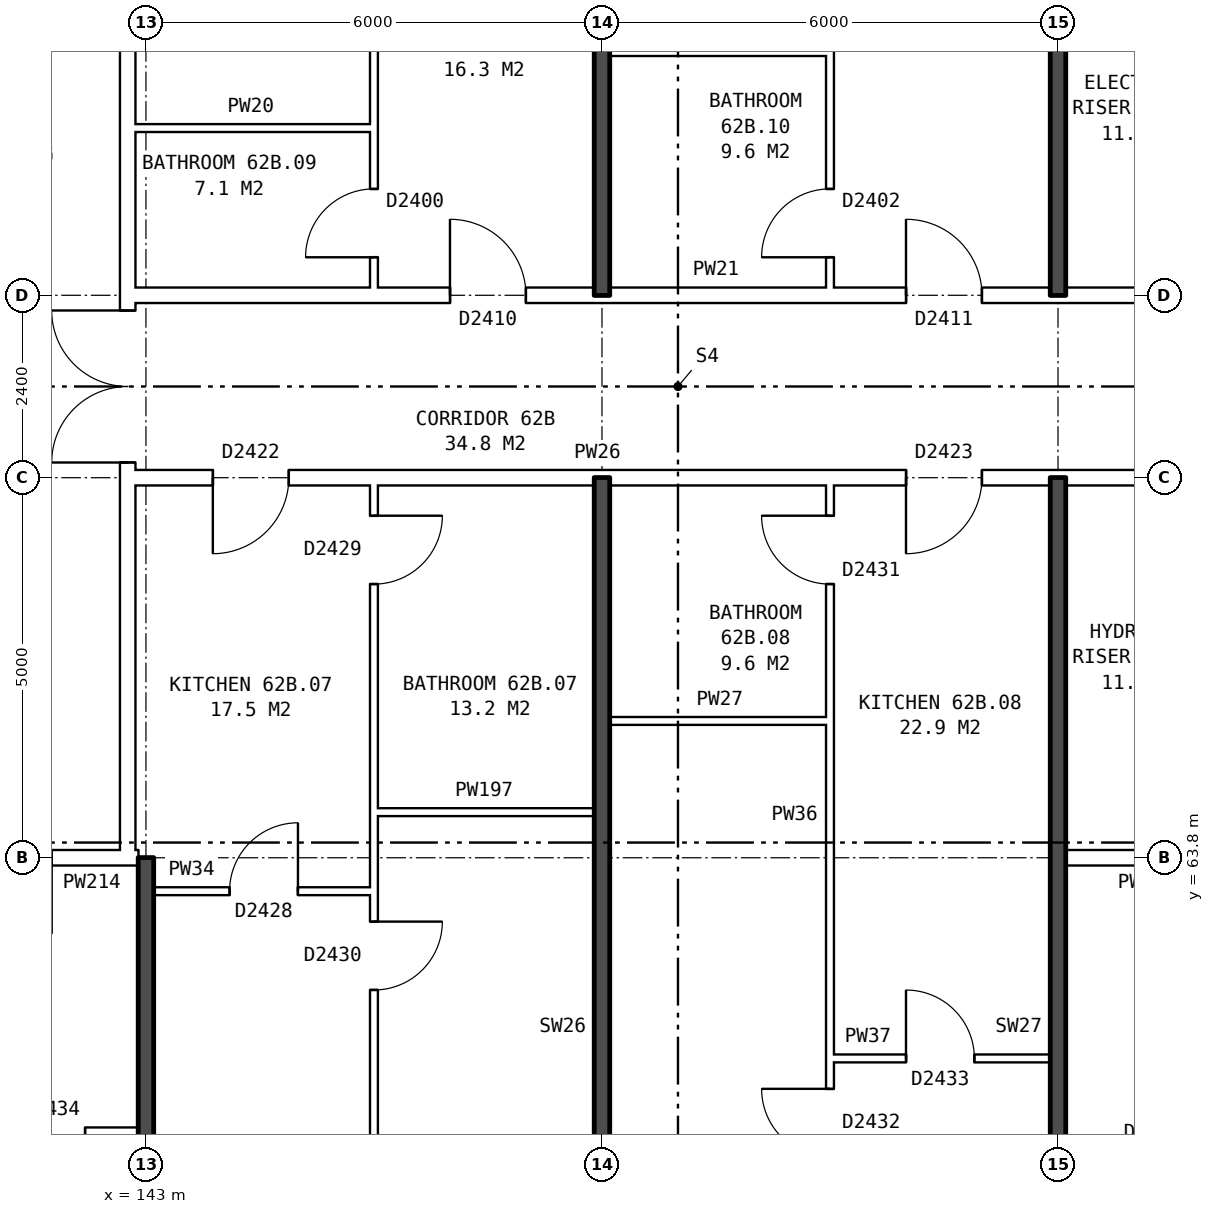
"""IFC4 building model, lengths in metres.
Left out: names, types, materials, properties, quantities, classifications, styles, units other than length and angle.
Written with IfcOpenShell. Run it as: python <this file> out.ifc"""

import sys

from ifc_helpers import new_model, si_unit, direction, frame, frame_2d, origin, place, context, subcontext, project, spatial, rectangle, extrude, element, fill, save


model = new_model("IFC4")
c1 = context("Model", 3, precision=1e-05, world=origin(), true_north=direction((0.0, 1.0)))
c2 = subcontext(c1, "Body", "Model", "MODEL_VIEW")
j1 = project(units=[si_unit("LENGTHUNIT", "METRE"), si_unit("PLANEANGLEUNIT", "RADIAN")], contexts=[c1])
p1 = place(None, origin())
s1 = spatial("IfcSite", under=j1, at=p1, CompositionType="ELEMENT")
p2 = place(p1, origin())
s2 = spatial("IfcBuilding", under=s1, at=p2, CompositionType="ELEMENT")
p3 = place(p2, frame((0.0, 0.0, 221.4)))
s3 = spatial("IfcBuildingStorey", under=s2, at=p3, CompositionType="ELEMENT", Elevation=221.4)
p4 = place(p3, frame((142.76, 63.9, 0.0), z_axis=(0.0, 0.0, 1.0), x_axis=(0.0, 1.0, 0.0)))
e1 = element("IfcWall", 1, at=p4, inside=s3, PredefinedType="PARTITIONING", context=c2, shape_type="SweptSolid", body=[
    extrude(rectangle(XDim=12.2, YDim=0.2, at=frame_2d((6.1, 0.0))), origin(), (0.0, 0.0, 1.0), 2.85),
])
p5 = place(p4, frame((5.1, 0.0, 0.0)))
e2 = element("IfcOpeningElement", 2, at=p5, cuts=e1, PredefinedType="OPENING", context=c2, shape_type="SweptSolid", body=[
    extrude(rectangle(XDim=2.0, YDim=2.1, at=frame_2d((1.0, 1.05))), frame((0.0, 0.11, 0.0), z_axis=(0.0, -1.0, 0.0), x_axis=(1.0, 0.0, 0.0)), (0.0, 0.0, 1.0), 0.22),
])
p6 = place(p3, frame((137.1, 60.2, 0.0), z_axis=(0.0, 0.0, 1.0), x_axis=(1.0, 0.0, 0.0)))
e3 = element("IfcWall", 3, at=p6, inside=s3, PredefinedType="PARTITIONING", context=c2, shape_type="SweptSolid", body=[
    extrude(rectangle(XDim=5.8, YDim=0.1, at=frame_2d((2.9, 0.0))), origin(), (0.0, 0.0, 1.0), 2.85),
])
p7 = place(p6, frame((1.3, 0.0, 0.0)))
e4 = element("IfcOpeningElement", 4, at=p7, cuts=e3, PredefinedType="OPENING", context=c2, shape_type="SweptSolid", body=[
    extrude(rectangle(XDim=0.9, YDim=2.1, at=frame_2d((0.45, 1.05))), frame((0.0, 0.06, 0.0), z_axis=(0.0, -1.0, 0.0), x_axis=(1.0, 0.0, 0.0)), (0.0, 0.0, 1.0), 0.12),
])
p8 = place(p6, frame((4.2, 0.0, 0.0)))
e5 = element("IfcOpeningElement", 5, at=p8, cuts=e3, PredefinedType="OPENING", context=c2, shape_type="SweptSolid", body=[
    extrude(rectangle(XDim=0.9, YDim=2.1, at=frame_2d((0.45, 1.05))), frame((0.0, 0.06, 0.0), z_axis=(0.0, -1.0, 0.0), x_axis=(1.0, 0.0, 0.0)), (0.0, 0.0, 1.0), 0.12),
])
p9 = place(p3, frame((152.0, 61.16, 0.0), z_axis=(0.0, 0.0, 1.0), x_axis=(1.0, 0.0, 0.0)))
e6 = element("IfcWall", 6, at=p9, inside=s3, PredefinedType="PARTITIONING", context=c2, shape_type="SweptSolid", body=[
    extrude(rectangle(XDim=2.9, YDim=0.1, at=frame_2d((1.45, 0.0))), origin(), (0.0, 0.0, 1.0), 2.85),
])
p10 = place(p9, frame((1.0, 0.0, 0.0)))
e7 = element("IfcOpeningElement", 7, at=p10, cuts=e6, PredefinedType="OPENING", context=c2, shape_type="SweptSolid", body=[
    extrude(rectangle(XDim=0.9, YDim=2.1, at=frame_2d((0.45, 1.05))), frame((0.0, 0.06, 0.0), z_axis=(0.0, -1.0, 0.0), x_axis=(1.0, 0.0, 0.0)), (0.0, 0.0, 1.0), 0.12),
])
p11 = place(p3, frame((143.1, 63.36, 0.0), z_axis=(0.0, 0.0, 1.0), x_axis=(1.0, 0.0, 0.0)))
e8 = element("IfcWall", 8, at=p11, inside=s3, PredefinedType="PARTITIONING", context=c2, shape_type="SweptSolid", body=[
    extrude(rectangle(XDim=2.9, YDim=0.1, at=frame_2d((1.45, 0.0))), origin(), (0.0, 0.0, 1.0), 2.85),
])
p12 = place(p11, frame((1.0, 0.0, 0.0)))
e9 = element("IfcOpeningElement", 9, at=p12, cuts=e8, PredefinedType="OPENING", context=c2, shape_type="SweptSolid", body=[
    extrude(rectangle(XDim=0.9, YDim=2.1, at=frame_2d((0.45, 1.05))), frame((0.0, 0.06, 0.0), z_axis=(0.0, -1.0, 0.0), x_axis=(1.0, 0.0, 0.0)), (0.0, 0.0, 1.0), 0.12),
])
p13 = place(p3, frame((139.76, 63.8, 0.0), z_axis=(0.0, 0.0, 1.0), x_axis=(1.0, 0.0, 0.0)))
e10 = element("IfcWall", 10, at=p13, inside=s3, PredefinedType="PARTITIONING", context=c2, shape_type="SweptSolid", body=[
    extrude(rectangle(XDim=3.0, YDim=0.2, at=frame_2d((1.5, 0.0))), origin(), (0.0, 0.0, 1.0), 2.85),
])
p14 = place(p13, frame((1.0, 0.0, 0.0)))
e11 = element("IfcOpeningElement", 11, at=p14, cuts=e10, PredefinedType="OPENING", context=c2, shape_type="SweptSolid", body=[
    extrude(rectangle(XDim=1.0, YDim=2.1, at=frame_2d((0.5, 1.05))), frame((0.0, 0.11, 0.0), z_axis=(0.0, -1.0, 0.0), x_axis=(1.0, 0.0, 0.0)), (0.0, 0.0, 1.0), 0.22),
])
p15 = place(p3, frame((142.76, 63.8, 0.0), z_axis=(0.0, 0.0, 1.0), x_axis=(1.0, 0.0, 0.0)))
e12 = element("IfcWall", 12, at=p15, inside=s3, PredefinedType="PARTITIONING", context=c2, shape_type="SweptSolid", body=[
    extrude(rectangle(XDim=0.14, YDim=0.2, at=frame_2d((0.07, 0.0))), origin(), (0.0, 0.0, 1.0), 2.85),
])
p16 = place(p3, frame((155.1, 63.8, 0.0), z_axis=(0.0, 0.0, 1.0), x_axis=(1.0, 0.0, 0.0)))
e13 = element("IfcWall", 13, at=p16, inside=s3, PredefinedType="PARTITIONING", context=c2, shape_type="SweptSolid", body=[
    extrude(rectangle(XDim=2.14, YDim=0.2, at=frame_2d((1.07, 0.0))), origin(), (0.0, 0.0, 1.0), 2.85),
])
for number, where, z_axis, x_axis in (
    (14, (146.0, 64.4, 0.0), (0.0, 0.0, 1.0), (1.0, 0.0, 0.0)),
    (15, (149.1, 65.6, 0.0), (0.0, 0.0, 1.0), (1.0, 0.0, 0.0)),
):
    element("IfcWall", number, at=place(p3, frame(where, z_axis=z_axis, x_axis=x_axis)), inside=s3, PredefinedType="PARTITIONING", context=c2, shape_type="SweptSolid", body=[
        extrude(rectangle(XDim=2.9, YDim=0.1, at=frame_2d((1.45, 0.0))), origin(), (0.0, 0.0, 1.0), 2.85),
    ])
p17 = place(p3, frame((142.76, 68.8, 0.0), z_axis=(0.0, 0.0, 1.0), x_axis=(1.0, 0.0, 0.0)))
e16 = element("IfcWall", 16, at=p17, inside=s3, PredefinedType="PARTITIONING", context=c2, shape_type="SweptSolid", body=[
    extrude(rectangle(XDim=14.48, YDim=0.2, at=frame_2d((7.24, 0.0))), origin(), (0.0, 0.0, 1.0), 2.85),
])
p18 = place(p17, frame((1.12, 0.0, 0.0)))
e17 = element("IfcOpeningElement", 17, at=p18, cuts=e16, PredefinedType="OPENING", context=c2, shape_type="SweptSolid", body=[
    extrude(rectangle(XDim=1.0, YDim=2.1, at=frame_2d((0.5, 1.05))), frame((0.0, 0.11, 0.0), z_axis=(0.0, -1.0, 0.0), x_axis=(1.0, 0.0, 0.0)), (0.0, 0.0, 1.0), 0.22),
])
p19 = place(p17, frame((10.24, 0.0, 0.0)))
e18 = element("IfcOpeningElement", 18, at=p19, cuts=e16, PredefinedType="OPENING", context=c2, shape_type="SweptSolid", body=[
    extrude(rectangle(XDim=1.0, YDim=2.1, at=frame_2d((0.5, 1.05))), frame((0.0, 0.11, 0.0), z_axis=(0.0, -1.0, 0.0), x_axis=(1.0, 0.0, 0.0)), (0.0, 0.0, 1.0), 0.22),
])
p20 = place(p3, frame((142.76, 71.2, 0.0), z_axis=(0.0, 0.0, 1.0), x_axis=(1.0, 0.0, 0.0)))
e19 = element("IfcWall", 19, at=p20, inside=s3, PredefinedType="PARTITIONING", context=c2, shape_type="SweptSolid", body=[
    extrude(rectangle(XDim=14.48, YDim=0.2, at=frame_2d((7.24, 0.0))), origin(), (0.0, 0.0, 1.0), 2.85),
])
p21 = place(p20, frame((4.24, 0.0, 0.0)))
e20 = element("IfcOpeningElement", 20, at=p21, cuts=e19, PredefinedType="OPENING", context=c2, shape_type="SweptSolid", body=[
    extrude(rectangle(XDim=1.0, YDim=2.1, at=frame_2d((0.5, 1.05))), frame((0.0, 0.11, 0.0), z_axis=(0.0, -1.0, 0.0), x_axis=(1.0, 0.0, 0.0)), (0.0, 0.0, 1.0), 0.22),
])
p22 = place(p20, frame((10.24, 0.0, 0.0)))
e21 = element("IfcOpeningElement", 21, at=p22, cuts=e19, PredefinedType="OPENING", context=c2, shape_type="SweptSolid", body=[
    extrude(rectangle(XDim=1.0, YDim=2.1, at=frame_2d((0.5, 1.05))), frame((0.0, 0.11, 0.0), z_axis=(0.0, -1.0, 0.0), x_axis=(1.0, 0.0, 0.0)), (0.0, 0.0, 1.0), 0.22),
])
p23 = place(p3, frame((142.76, 73.4, 0.0), z_axis=(0.0, 0.0, 1.0), x_axis=(1.0, 0.0, 0.0)))
e22 = element("IfcWall", 22, at=p23, inside=s3, PredefinedType="PARTITIONING", context=c2, shape_type="SweptSolid", body=[
    extrude(rectangle(XDim=3.24, YDim=0.1, at=frame_2d((1.62, 0.0))), origin(), (0.0, 0.0, 1.0), 2.85),
])
p24 = place(p3, frame((149.1, 74.4, 0.0), z_axis=(0.0, 0.0, 1.0), x_axis=(1.0, 0.0, 0.0)))
e23 = element("IfcWall", 23, at=p24, inside=s3, PredefinedType="PARTITIONING", context=c2, shape_type="SweptSolid", body=[
    extrude(rectangle(XDim=2.9, YDim=0.1, at=frame_2d((1.45, 0.0))), origin(), (0.0, 0.0, 1.0), 2.85),
])
p25 = place(p3, frame((143.0, 54.36, 0.0), z_axis=(0.0, 0.0, 1.0), x_axis=(0.0, 1.0, 0.0)))
e24 = element("IfcWall", 24, at=p25, inside=s3, PredefinedType="SOLIDWALL", context=c2, shape_type="SweptSolid", body=[
    extrude(rectangle(XDim=9.44, YDim=0.2, at=frame_2d((4.72, 0.0))), origin(), (0.0, 0.0, 1.0), 2.85),
])
p26 = place(p3, frame((146.0, 54.36, 0.0), z_axis=(0.0, 0.0, 1.0), x_axis=(0.0, 1.0, 0.0)))
e25 = element("IfcWall", 25, at=p26, inside=s3, PredefinedType="PARTITIONING", context=c2, shape_type="SweptSolid", body=[
    extrude(rectangle(XDim=14.34, YDim=0.1, at=frame_2d((7.17, 0.0))), origin(), (0.0, 0.0, 1.0), 2.85),
])
p27 = place(p26, frame((7.7, 0.0, 0.0)))
e26 = element("IfcOpeningElement", 26, at=p27, cuts=e25, PredefinedType="OPENING", context=c2, shape_type="SweptSolid", body=[
    extrude(rectangle(XDim=0.9, YDim=2.1, at=frame_2d((0.45, 1.05))), frame((0.0, 0.06, 0.0), z_axis=(0.0, -1.0, 0.0), x_axis=(1.0, 0.0, 0.0)), (0.0, 0.0, 1.0), 0.12),
])
p28 = place(p26, frame((13.04, 0.0, 0.0)))
e27 = element("IfcOpeningElement", 27, at=p28, cuts=e25, PredefinedType="OPENING", context=c2, shape_type="SweptSolid", body=[
    extrude(rectangle(XDim=0.9, YDim=2.1, at=frame_2d((0.45, 1.05))), frame((0.0, 0.06, 0.0), z_axis=(0.0, -1.0, 0.0), x_axis=(1.0, 0.0, 0.0)), (0.0, 0.0, 1.0), 0.12),
])
p29 = place(p3, frame((146.0, 71.3, 0.0), z_axis=(0.0, 0.0, 1.0), x_axis=(0.0, 1.0, 0.0)))
e28 = element("IfcWall", 28, at=p29, inside=s3, PredefinedType="PARTITIONING", context=c2, shape_type="SweptSolid", body=[
    extrude(rectangle(XDim=14.34, YDim=0.1, at=frame_2d((7.17, 0.0))), origin(), (0.0, 0.0, 1.0), 2.85),
])
p30 = place(p29, frame((5.74, 0.0, 0.0)))
e29 = element("IfcOpeningElement", 29, at=p30, cuts=e28, PredefinedType="OPENING", context=c2, shape_type="SweptSolid", body=[
    extrude(rectangle(XDim=0.9, YDim=2.1, at=frame_2d((0.45, 1.05))), frame((0.0, 0.06, 0.0), z_axis=(0.0, -1.0, 0.0), x_axis=(1.0, 0.0, 0.0)), (0.0, 0.0, 1.0), 0.12),
])
p31 = place(p29, frame((0.4, 0.0, 0.0)))
e30 = element("IfcOpeningElement", 30, at=p31, cuts=e28, PredefinedType="OPENING", context=c2, shape_type="SweptSolid", body=[
    extrude(rectangle(XDim=0.9, YDim=2.1, at=frame_2d((0.45, 1.05))), frame((0.0, 0.06, 0.0), z_axis=(0.0, -1.0, 0.0), x_axis=(1.0, 0.0, 0.0)), (0.0, 0.0, 1.0), 0.12),
])
for number, where, z_axis, x_axis in (
    (31, (149.0, 54.36, 0.0), (0.0, 0.0, 1.0), (0.0, 1.0, 0.0)),
    (32, (149.0, 71.2, 0.0), (0.0, 0.0, 1.0), (0.0, 1.0, 0.0)),
):
    element("IfcWall", number, at=place(p3, frame(where, z_axis=z_axis, x_axis=x_axis)), inside=s3, PredefinedType="SOLIDWALL", context=c2, shape_type="SweptSolid", body=[
        extrude(rectangle(XDim=14.44, YDim=0.2, at=frame_2d((7.22, 0.0))), origin(), (0.0, 0.0, 1.0), 2.85),
    ])
p32 = place(p3, frame((152.0, 54.36, 0.0), z_axis=(0.0, 0.0, 1.0), x_axis=(0.0, 1.0, 0.0)))
e33 = element("IfcWall", 33, at=p32, inside=s3, PredefinedType="PARTITIONING", context=c2, shape_type="SweptSolid", body=[
    extrude(rectangle(XDim=14.34, YDim=0.1, at=frame_2d((7.17, 0.0))), origin(), (0.0, 0.0, 1.0), 2.85),
])
p33 = place(p32, frame((5.5, 0.0, 0.0)))
e34 = element("IfcOpeningElement", 34, at=p33, cuts=e33, PredefinedType="OPENING", context=c2, shape_type="SweptSolid", body=[
    extrude(rectangle(XDim=0.9, YDim=2.1, at=frame_2d((0.45, 1.05))), frame((0.0, 0.06, 0.0), z_axis=(0.0, -1.0, 0.0), x_axis=(1.0, 0.0, 0.0)), (0.0, 0.0, 1.0), 0.12),
])
p34 = place(p32, frame((13.04, 0.0, 0.0)))
e35 = element("IfcOpeningElement", 35, at=p34, cuts=e33, PredefinedType="OPENING", context=c2, shape_type="SweptSolid", body=[
    extrude(rectangle(XDim=0.9, YDim=2.1, at=frame_2d((0.45, 1.05))), frame((0.0, 0.06, 0.0), z_axis=(0.0, -1.0, 0.0), x_axis=(1.0, 0.0, 0.0)), (0.0, 0.0, 1.0), 0.12),
])
p35 = place(p3, frame((152.0, 71.3, 0.0), z_axis=(0.0, 0.0, 1.0), x_axis=(0.0, 1.0, 0.0)))
e36 = element("IfcWall", 36, at=p35, inside=s3, PredefinedType="PARTITIONING", context=c2, shape_type="SweptSolid", body=[
    extrude(rectangle(XDim=14.34, YDim=0.1, at=frame_2d((7.17, 0.0))), origin(), (0.0, 0.0, 1.0), 2.85),
])
p36 = place(p35, frame((6.74, 0.0, 0.0)))
e37 = element("IfcOpeningElement", 37, at=p36, cuts=e36, PredefinedType="OPENING", context=c2, shape_type="SweptSolid", body=[
    extrude(rectangle(XDim=0.9, YDim=2.1, at=frame_2d((0.45, 1.05))), frame((0.0, 0.06, 0.0), z_axis=(0.0, -1.0, 0.0), x_axis=(1.0, 0.0, 0.0)), (0.0, 0.0, 1.0), 0.12),
])
p37 = place(p35, frame((0.4, 0.0, 0.0)))
e38 = element("IfcOpeningElement", 38, at=p37, cuts=e36, PredefinedType="OPENING", context=c2, shape_type="SweptSolid", body=[
    extrude(rectangle(XDim=0.9, YDim=2.1, at=frame_2d((0.45, 1.05))), frame((0.0, 0.06, 0.0), z_axis=(0.0, -1.0, 0.0), x_axis=(1.0, 0.0, 0.0)), (0.0, 0.0, 1.0), 0.12),
])
for number, where, z_axis, x_axis in (
    (39, (155.0, 54.36, 0.0), (0.0, 0.0, 1.0), (0.0, 1.0, 0.0)),
    (40, (155.0, 71.2, 0.0), (0.0, 0.0, 1.0), (0.0, 1.0, 0.0)),
):
    element("IfcWall", number, at=place(p3, frame(where, z_axis=z_axis, x_axis=x_axis)), inside=s3, PredefinedType="SOLIDWALL", context=c2, shape_type="SweptSolid", body=[
        extrude(rectangle(XDim=14.44, YDim=0.2, at=frame_2d((7.22, 0.0))), origin(), (0.0, 0.0, 1.0), 2.85),
    ])
p38 = place(p5, origin())
e41 = element("IfcDoor", 41, at=p38, inside=s3, OperationType="DOUBLE_DOOR_SINGLE_SWING", PredefinedType="DOOR", context=c2, shape_type="SweptSolid", body=[
    extrude(rectangle(XDim=2.0, YDim=2.1, at=frame_2d((1.0, 1.05))), frame((0.0, 0.025, 0.0), z_axis=(0.0, -1.0, 0.0), x_axis=(1.0, 0.0, 0.0)), (0.0, 0.0, 1.0), 0.05),
])
fill(e2, e41)
p39 = place(p8, frame((0.9, 0.0, 0.0), z_axis=(0.0, 0.0, 1.0), x_axis=(-1.0, 0.0, 0.0)))
e42 = element("IfcDoor", 42, at=p39, inside=s3, OperationType="SINGLE_SWING_RIGHT", PredefinedType="DOOR", context=c2, shape_type="SweptSolid", body=[
    extrude(rectangle(XDim=0.9, YDim=2.1, at=frame_2d((0.45, 1.05))), frame((0.0, 0.025, 0.0), z_axis=(0.0, -1.0, 0.0), x_axis=(1.0, 0.0, 0.0)), (0.0, 0.0, 1.0), 0.05),
])
fill(e5, e42)
p40 = place(p27, frame((0.9, 0.0, 0.0), z_axis=(0.0, 0.0, 1.0), x_axis=(-1.0, 0.0, 0.0)))
e43 = element("IfcDoor", 43, at=p40, inside=s3, OperationType="SINGLE_SWING_LEFT", PredefinedType="DOOR", context=c2, shape_type="SweptSolid", body=[
    extrude(rectangle(XDim=0.9, YDim=2.1, at=frame_2d((0.45, 1.05))), frame((0.0, 0.025, 0.0), z_axis=(0.0, -1.0, 0.0), x_axis=(1.0, 0.0, 0.0)), (0.0, 0.0, 1.0), 0.05),
])
fill(e26, e43)
p41 = place(p18, frame((1.0, 0.0, 0.0), z_axis=(0.0, 0.0, 1.0), x_axis=(-1.0, 0.0, 0.0)))
e44 = element("IfcDoor", 44, at=p41, inside=s3, OperationType="SINGLE_SWING_RIGHT", PredefinedType="DOOR", context=c2, shape_type="SweptSolid", body=[
    extrude(rectangle(XDim=1.0, YDim=2.1, at=frame_2d((0.5, 1.05))), frame((0.0, 0.025, 0.0), z_axis=(0.0, -1.0, 0.0), x_axis=(1.0, 0.0, 0.0)), (0.0, 0.0, 1.0), 0.05),
])
fill(e17, e44)
p42 = place(p12, origin())
e45 = element("IfcDoor", 45, at=p42, inside=s3, OperationType="SINGLE_SWING_RIGHT", PredefinedType="DOOR", context=c2, shape_type="SweptSolid", body=[
    extrude(rectangle(XDim=0.9, YDim=2.1, at=frame_2d((0.45, 1.05))), frame((0.0, 0.025, 0.0), z_axis=(0.0, -1.0, 0.0), x_axis=(1.0, 0.0, 0.0)), (0.0, 0.0, 1.0), 0.05),
])
fill(e9, e45)
p43 = place(p28, frame((0.9, 0.0, 0.0), z_axis=(0.0, 0.0, 1.0), x_axis=(-1.0, 0.0, 0.0)))
e46 = element("IfcDoor", 46, at=p43, inside=s3, OperationType="SINGLE_SWING_LEFT", PredefinedType="DOOR", context=c2, shape_type="SweptSolid", body=[
    extrude(rectangle(XDim=0.9, YDim=2.1, at=frame_2d((0.45, 1.05))), frame((0.0, 0.025, 0.0), z_axis=(0.0, -1.0, 0.0), x_axis=(1.0, 0.0, 0.0)), (0.0, 0.0, 1.0), 0.05),
])
fill(e27, e46)
p44 = place(p33, origin())
e47 = element("IfcDoor", 47, at=p44, inside=s3, OperationType="SINGLE_SWING_RIGHT", PredefinedType="DOOR", context=c2, shape_type="SweptSolid", body=[
    extrude(rectangle(XDim=0.9, YDim=2.1, at=frame_2d((0.45, 1.05))), frame((0.0, 0.025, 0.0), z_axis=(0.0, -1.0, 0.0), x_axis=(1.0, 0.0, 0.0)), (0.0, 0.0, 1.0), 0.05),
])
fill(e34, e47)
p45 = place(p19, frame((1.0, 0.0, 0.0), z_axis=(0.0, 0.0, 1.0), x_axis=(-1.0, 0.0, 0.0)))
e48 = element("IfcDoor", 48, at=p45, inside=s3, OperationType="SINGLE_SWING_RIGHT", PredefinedType="DOOR", context=c2, shape_type="SweptSolid", body=[
    extrude(rectangle(XDim=1.0, YDim=2.1, at=frame_2d((0.5, 1.05))), frame((0.0, 0.025, 0.0), z_axis=(0.0, -1.0, 0.0), x_axis=(1.0, 0.0, 0.0)), (0.0, 0.0, 1.0), 0.05),
])
fill(e18, e48)
p46 = place(p10, origin())
e49 = element("IfcDoor", 49, at=p46, inside=s3, OperationType="SINGLE_SWING_LEFT", PredefinedType="DOOR", context=c2, shape_type="SweptSolid", body=[
    extrude(rectangle(XDim=0.9, YDim=2.1, at=frame_2d((0.45, 1.05))), frame((0.0, 0.025, 0.0), z_axis=(0.0, -1.0, 0.0), x_axis=(1.0, 0.0, 0.0)), (0.0, 0.0, 1.0), 0.05),
])
fill(e7, e49)
p47 = place(p34, origin())
e50 = element("IfcDoor", 50, at=p47, inside=s3, OperationType="SINGLE_SWING_RIGHT", PredefinedType="DOOR", context=c2, shape_type="SweptSolid", body=[
    extrude(rectangle(XDim=0.9, YDim=2.1, at=frame_2d((0.45, 1.05))), frame((0.0, 0.025, 0.0), z_axis=(0.0, -1.0, 0.0), x_axis=(1.0, 0.0, 0.0)), (0.0, 0.0, 1.0), 0.05),
])
fill(e35, e50)
p48 = place(p21, origin())
e51 = element("IfcDoor", 51, at=p48, inside=s3, OperationType="SINGLE_SWING_LEFT", PredefinedType="DOOR", context=c2, shape_type="SweptSolid", body=[
    extrude(rectangle(XDim=1.0, YDim=2.1, at=frame_2d((0.5, 1.05))), frame((0.0, 0.025, 0.0), z_axis=(0.0, -1.0, 0.0), x_axis=(1.0, 0.0, 0.0)), (0.0, 0.0, 1.0), 0.05),
])
fill(e20, e51)
p49 = place(p31, origin())
e52 = element("IfcDoor", 52, at=p49, inside=s3, OperationType="SINGLE_SWING_LEFT", PredefinedType="DOOR", context=c2, shape_type="SweptSolid", body=[
    extrude(rectangle(XDim=0.9, YDim=2.1, at=frame_2d((0.45, 1.05))), frame((0.0, 0.025, 0.0), z_axis=(0.0, -1.0, 0.0), x_axis=(1.0, 0.0, 0.0)), (0.0, 0.0, 1.0), 0.05),
])
fill(e30, e52)
p50 = place(p22, origin())
e53 = element("IfcDoor", 53, at=p50, inside=s3, OperationType="SINGLE_SWING_LEFT", PredefinedType="DOOR", context=c2, shape_type="SweptSolid", body=[
    extrude(rectangle(XDim=1.0, YDim=2.1, at=frame_2d((0.5, 1.05))), frame((0.0, 0.025, 0.0), z_axis=(0.0, -1.0, 0.0), x_axis=(1.0, 0.0, 0.0)), (0.0, 0.0, 1.0), 0.05),
])
fill(e21, e53)
p51 = place(p37, origin())
e54 = element("IfcDoor", 54, at=p51, inside=s3, OperationType="SINGLE_SWING_LEFT", PredefinedType="DOOR", context=c2, shape_type="SweptSolid", body=[
    extrude(rectangle(XDim=0.9, YDim=2.1, at=frame_2d((0.45, 1.05))), frame((0.0, 0.025, 0.0), z_axis=(0.0, -1.0, 0.0), x_axis=(1.0, 0.0, 0.0)), (0.0, 0.0, 1.0), 0.05),
])
fill(e38, e54)
save(model, sys.argv[1])
